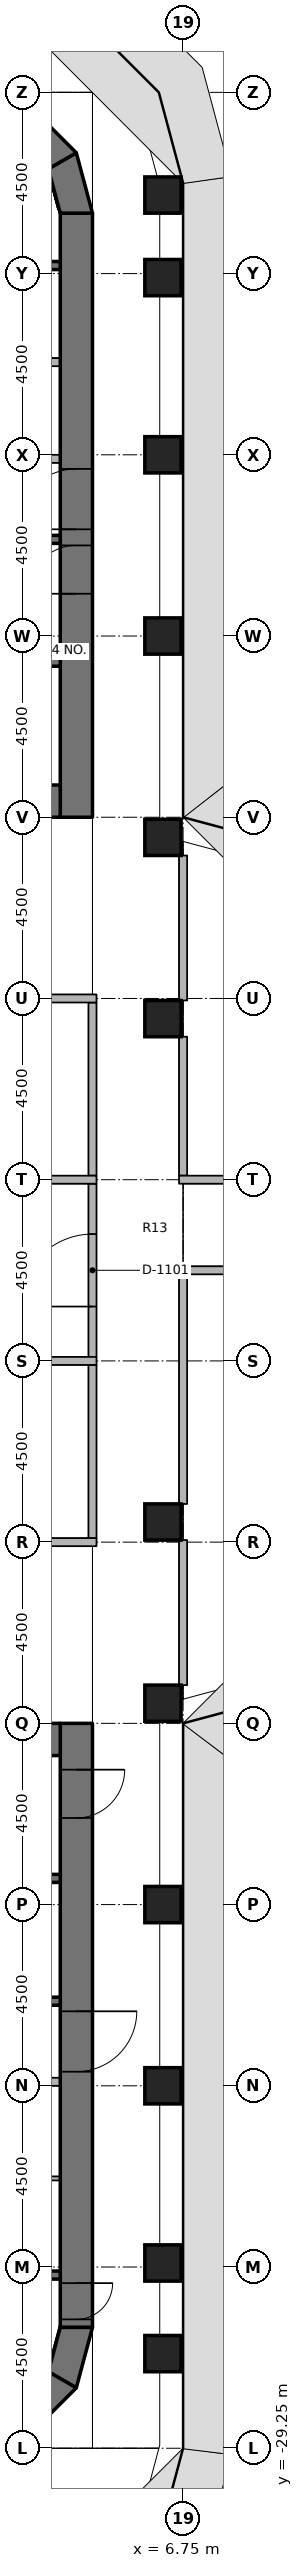
"""IFC4 building model, lengths in metres.
Left out: names, types, materials, properties, quantities, classifications, styles, units other than length and angle.
Written with IfcOpenShell. Run it as: python <this file> out.ifc"""

import sys

from ifc_helpers import new_model, si_unit, direction, frame, frame_2d, origin, origin_2d, place, context, subcontext, project, spatial, polyline, rectangle, outline, extrude, element, fill, save


model = new_model("IFC4")
c1 = context("Model", 3, precision=1e-05, world=origin(), true_north=direction((0.0, 1.0)))
c2 = subcontext(c1, "Body", "Model", "MODEL_VIEW")
j1 = project(units=[si_unit("LENGTHUNIT", "METRE"), si_unit("PLANEANGLEUNIT", "RADIAN")], contexts=[c1])
p1 = place(None, origin())
s1 = spatial("IfcSite", under=j1, at=p1, CompositionType="ELEMENT")
p2 = place(p1, origin())
s2 = spatial("IfcBuilding", under=s1, at=p2, CompositionType="ELEMENT")
p3 = place(p2, frame((0.0, 0.0, 124.6)))
s3 = spatial("IfcBuildingStorey", under=s2, at=p3, CompositionType="ELEMENT", Elevation=124.6)
for number, where, z_axis, x_axis in (
    (1, (6.25, -26.9, 0.0), (0.0, 0.0, 1.0), (1.0, 0.0, 0.0)),
    (2, (6.25, -24.65, 0.0), (0.0, 0.0, 1.0), (1.0, 0.0, 0.0)),
    (3, (6.25, -20.25, 0.0), (0.0, 0.0, 1.0), (1.0, 0.0, 0.0)),
    (4, (6.25, -15.75, 0.0), (0.0, 0.0, 1.0), (1.0, 0.0, 0.0)),
    (5, (6.25, -10.75, 0.0), (0.0, 0.0, 1.0), (1.0, 0.0, 0.0)),
    (6, (6.25, -6.25, 0.0), (0.0, 0.0, 1.0), (1.0, 0.0, 0.0)),
    (7, (6.25, 6.25, 0.0), (0.0, 0.0, 1.0), (1.0, 0.0, 0.0)),
    (8, (6.25, 10.75, 0.0), (0.0, 0.0, 1.0), (1.0, 0.0, 0.0)),
    (9, (6.25, 15.75, 0.0), (0.0, 0.0, 1.0), (1.0, 0.0, 0.0)),
    (10, (6.25, 20.25, 0.0), (0.0, 0.0, 1.0), (1.0, 0.0, 0.0)),
    (11, (6.25, 24.65, 0.0), (0.0, 0.0, 1.0), (1.0, 0.0, 0.0)),
    (12, (6.25, 26.7, 0.0), (0.0, 0.0, 1.0), (1.0, 0.0, 0.0)),
):
    element("IfcColumn", number, at=place(p3, frame(where, z_axis=z_axis, x_axis=x_axis)), inside=s3, PredefinedType="COLUMN", context=c2, shape_type="SweptSolid", body=[
        extrude(rectangle(XDim=0.9, YDim=0.9, at=origin_2d()), origin(), (0.0, 0.0, 1.0), 3.65),
    ])
p4 = place(p3, frame((4.1, 11.25, 0.0), z_axis=(0.0, 0.0, 1.0), x_axis=(0.0, 1.0, 0.0)))
e13 = element("IfcWall", 13, at=p4, inside=s3, PredefinedType="SHEAR", context=c2, shape_type="SweptSolid", body=[
    extrude(rectangle(XDim=15.0, YDim=0.8, at=frame_2d((7.5, 0.0))), origin(), (0.0, 0.0, 1.0), 3.8),
])
p5 = place(p4, frame((7.15, 0.0, 0.0)))
e14 = element("IfcOpeningElement", 14, at=p5, cuts=e13, PredefinedType="OPENING", context=c2, shape_type="SweptSolid", body=[
    extrude(rectangle(XDim=1.5, YDim=2.3, at=frame_2d((0.75, 1.15))), frame((0.0, 0.41, 0.0), z_axis=(0.0, -1.0, 0.0), x_axis=(1.0, 0.0, 0.0)), (0.0, 0.0, 1.0), 0.82),
])
p6 = place(p4, frame((5.55, 0.0, 0.0)))
e15 = element("IfcOpeningElement", 15, at=p6, cuts=e13, PredefinedType="OPENING", context=c2, shape_type="SweptSolid", body=[
    extrude(rectangle(XDim=1.2, YDim=2.1, at=frame_2d((0.6, 1.05))), frame((0.0, 0.41, 0.0), z_axis=(0.0, -1.0, 0.0), x_axis=(1.0, 0.0, 0.0)), (0.0, 0.0, 1.0), 0.82),
])
p7 = place(p3, frame((-3.7, 11.65, 0.0), z_axis=(0.0, 0.0, 1.0), x_axis=(1.0, 0.0, 0.0)))
e16 = element("IfcWall", 16, at=p7, inside=s3, PredefinedType="SHEAR", context=c2, shape_type="SweptSolid", body=[
    extrude(rectangle(XDim=7.4, YDim=0.8, at=frame_2d((3.7, 0.0))), origin(), (0.0, 0.0, 1.0), 3.8),
])
p8 = place(p3, origin())
e17 = element("IfcWall", 17, at=p8, inside=s3, PredefinedType="SHEAR", context=c2, shape_type="SweptSolid", body=[
    extrude(outline(polyline([(4.5, 26.25), (4.098, 27.75), (3.405, 27.35), (3.7, 26.25), (4.5, 26.25)])), origin(), (0.0, 0.0, 1.0), 3.8),
])
p9 = place(p3, origin())
e18 = element("IfcWall", 18, at=p9, inside=s3, PredefinedType="SHEAR", context=c2, shape_type="SweptSolid", body=[
    extrude(outline(polyline([(4.098, 27.75), (3.0, 28.848), (2.6, 28.155), (3.405, 27.35), (4.098, 27.75)])), origin(), (0.0, 0.0, 1.0), 3.8),
])
p10 = place(p3, frame((4.1, -11.25, 0.0), z_axis=(0.0, 0.0, 1.0), x_axis=(0.0, -1.0, 0.0)))
e19 = element("IfcWall", 19, at=p10, inside=s3, PredefinedType="SHEAR", context=c2, shape_type="SweptSolid", body=[
    extrude(rectangle(XDim=15.0, YDim=0.8, at=frame_2d((7.5, 0.0))), origin(), (0.0, 0.0, 1.0), 3.8),
])
p11 = place(p10, frame((7.15, 0.0, 0.0)))
e20 = element("IfcOpeningElement", 20, at=p11, cuts=e19, PredefinedType="OPENING", context=c2, shape_type="SweptSolid", body=[
    extrude(rectangle(XDim=1.5, YDim=2.3, at=frame_2d((0.75, 1.15))), frame((0.0, 0.41, 0.0), z_axis=(0.0, -1.0, 0.0), x_axis=(1.0, 0.0, 0.0)), (0.0, 0.0, 1.0), 0.82),
])
p12 = place(p10, frame((13.9, 0.0, 0.0)))
e21 = element("IfcOpeningElement", 21, at=p12, cuts=e19, PredefinedType="OPENING", context=c2, shape_type="SweptSolid", body=[
    extrude(rectangle(XDim=0.9, YDim=2.1, at=frame_2d((0.45, 1.05))), frame((0.0, 0.41, 0.0), z_axis=(0.0, -1.0, 0.0), x_axis=(1.0, 0.0, 0.0)), (0.0, 0.0, 1.0), 0.82),
])
p13 = place(p10, frame((1.15, 0.0, 0.0)))
e22 = element("IfcOpeningElement", 22, at=p13, cuts=e19, PredefinedType="OPENING", context=c2, shape_type="SweptSolid", body=[
    extrude(rectangle(XDim=1.2, YDim=2.1, at=frame_2d((0.6, 1.05))), frame((0.0, 0.41, 0.0), z_axis=(0.0, -1.0, 0.0), x_axis=(1.0, 0.0, 0.0)), (0.0, 0.0, 1.0), 0.82),
])
p14 = place(p3, frame((-3.7, -11.65, 0.0), z_axis=(0.0, 0.0, 1.0), x_axis=(1.0, 0.0, 0.0)))
e23 = element("IfcWall", 23, at=p14, inside=s3, PredefinedType="SHEAR", context=c2, shape_type="SweptSolid", body=[
    extrude(rectangle(XDim=7.4, YDim=0.8, at=frame_2d((3.7, 0.0))), origin(), (0.0, 0.0, 1.0), 3.8),
])
p15 = place(p3, origin())
e24 = element("IfcWall", 24, at=p15, inside=s3, PredefinedType="SHEAR", context=c2, shape_type="SweptSolid", body=[
    extrude(outline(polyline([(4.5, -26.25), (4.098, -27.75), (3.405, -27.35), (3.7, -26.25), (4.5, -26.25)])), origin(), (0.0, 0.0, 1.0), 3.8),
])
p16 = place(p3, origin())
e25 = element("IfcWall", 25, at=p16, inside=s3, PredefinedType="SHEAR", context=c2, shape_type="SweptSolid", body=[
    extrude(outline(polyline([(4.098, -27.75), (3.0, -28.848), (2.6, -28.155), (3.405, -27.35), (4.098, -27.75)])), origin(), (0.0, 0.0, 1.0), 3.8),
])
for number, where, z_axis, x_axis in (
    (26, (-3.7, 24.95, 0.0), (0.0, 0.0, 1.0), (1.0, 0.0, 0.0)),
    (27, (-3.7, 18.15, 0.0), (0.0, 0.0, 1.0), (1.0, 0.0, 0.0)),
    (28, (-3.7, 15.1, 0.0), (0.0, 0.0, 1.0), (1.0, 0.0, 0.0)),
):
    element("IfcWall", number, at=place(p3, frame(where, z_axis=z_axis, x_axis=x_axis)), inside=s3, PredefinedType="SHEAR", context=c2, shape_type="SweptSolid", body=[
        extrude(rectangle(XDim=7.4, YDim=0.2, at=frame_2d((3.7, 0.0))), origin(), (0.0, 0.0, 1.0), 3.65),
    ])
p17 = place(p3, frame((0.9, 20.15, 0.0), z_axis=(0.0, 0.0, 1.0), x_axis=(1.0, 0.0, 0.0)))
e29 = element("IfcWall", 29, at=p17, inside=s3, PredefinedType="PARTITIONING", context=c2, shape_type="SweptSolid", body=[
    extrude(rectangle(XDim=2.8, YDim=0.2, at=frame_2d((1.4, 0.0))), origin(), (0.0, 0.0, 1.0), 3.65),
])
p18 = place(p3, frame((1.1, 22.55, 0.0), z_axis=(0.0, 0.0, 1.0), x_axis=(1.0, 0.0, 0.0)))
e30 = element("IfcWall", 30, at=p18, inside=s3, PredefinedType="PARTITIONING", context=c2, shape_type="SweptSolid", body=[
    extrude(rectangle(XDim=2.6, YDim=0.2, at=frame_2d((1.3, 0.0))), origin(), (0.0, 0.0, 1.0), 3.65),
])
for number, where, z_axis, x_axis in (
    (31, (3.7, -24.95, 0.0), (0.0, 0.0, 1.0), (-1.0, 0.0, 0.0)),
    (32, (3.7, -18.15, 0.0), (0.0, 0.0, 1.0), (-1.0, 0.0, 0.0)),
    (33, (3.7, -15.1, 0.0), (0.0, 0.0, 1.0), (-1.0, 0.0, 0.0)),
):
    element("IfcWall", number, at=place(p3, frame(where, z_axis=z_axis, x_axis=x_axis)), inside=s3, PredefinedType="SHEAR", context=c2, shape_type="SweptSolid", body=[
        extrude(rectangle(XDim=7.4, YDim=0.2, at=frame_2d((3.7, 0.0))), origin(), (0.0, 0.0, 1.0), 3.65),
    ])
p19 = place(p3, frame((3.7, -20.15, 0.0), z_axis=(0.0, 0.0, 1.0), x_axis=(-1.0, 0.0, 0.0)))
e34 = element("IfcWall", 34, at=p19, inside=s3, PredefinedType="PARTITIONING", context=c2, shape_type="SweptSolid", body=[
    extrude(rectangle(XDim=2.8, YDim=0.2, at=frame_2d((1.4, 0.0))), origin(), (0.0, 0.0, 1.0), 3.65),
])
p20 = place(p3, frame((3.7, -22.55, 0.0), z_axis=(0.0, 0.0, 1.0), x_axis=(-1.0, 0.0, 0.0)))
e35 = element("IfcWall", 35, at=p20, inside=s3, PredefinedType="PARTITIONING", context=c2, shape_type="SweptSolid", body=[
    extrude(rectangle(XDim=2.6, YDim=0.1, at=frame_2d((1.3, 0.0))), origin(), (0.0, 0.0, 1.0), 3.65),
])
p21 = place(p3, frame((4.5, 2.35, 0.0), z_axis=(0.0, 0.0, 1.0), x_axis=(0.0, 1.0, 0.0)))
e36 = element("IfcWall", 36, at=p21, inside=s3, PredefinedType="PARTITIONING", context=c2, shape_type="SweptSolid", body=[
    extrude(rectangle(XDim=4.3, YDim=0.2, at=frame_2d((2.15, 0.0))), origin(), (0.0, 0.0, 1.0), 2.738),
])
p22 = place(p3, frame((4.5, -2.15, 0.0), z_axis=(0.0, 0.0, 1.0), x_axis=(0.0, 1.0, 0.0)))
e37 = element("IfcWall", 37, at=p22, inside=s3, PredefinedType="PARTITIONING", context=c2, shape_type="SweptSolid", body=[
    extrude(rectangle(XDim=4.3, YDim=0.2, at=frame_2d((2.15, 0.0))), origin(), (0.0, 0.0, 1.0), 2.738),
])
p23 = place(p22, frame((1.25, 0.0, 0.0)))
e38 = element("IfcOpeningElement", 38, at=p23, cuts=e37, PredefinedType="OPENING", context=c2, shape_type="SweptSolid", body=[
    extrude(rectangle(XDim=1.8, YDim=2.1, at=frame_2d((0.9, 1.05))), frame((0.0, 0.11, 0.0), z_axis=(0.0, -1.0, 0.0), x_axis=(1.0, 0.0, 0.0)), (0.0, 0.0, 1.0), 0.22),
])
p24 = place(p3, frame((4.5, -6.65, 0.0), z_axis=(0.0, 0.0, 1.0), x_axis=(0.0, 1.0, 0.0)))
e39 = element("IfcWall", 39, at=p24, inside=s3, PredefinedType="PARTITIONING", context=c2, shape_type="SweptSolid", body=[
    extrude(rectangle(XDim=4.3, YDim=0.2, at=frame_2d((2.15, 0.0))), origin(), (0.0, 0.0, 1.0), 2.738),
])
p25 = place(p3, frame((6.75, 2.35, 0.0), z_axis=(0.0, 0.0, 1.0), x_axis=(0.0, 1.0, 0.0)))
e40 = element("IfcWall", 40, at=p25, inside=s3, PredefinedType="PARTITIONING", context=c2, shape_type="SweptSolid", body=[
    extrude(rectangle(XDim=3.45, YDim=0.2, at=frame_2d((1.725, 0.0))), origin(), (0.0, 0.0, 1.0), 2.738),
])
for number, where, z_axis, x_axis in (
    (41, (6.75, 6.7, 0.0), (0.0, 0.0, 1.0), (0.0, 1.0, 0.0)),
    (42, (6.75, -10.3, 0.0), (0.0, 0.0, 1.0), (0.0, 1.0, 0.0)),
):
    element("IfcWall", number, at=place(p3, frame(where, z_axis=z_axis, x_axis=x_axis)), inside=s3, PredefinedType="PARTITIONING", context=c2, shape_type="SweptSolid", body=[
        extrude(rectangle(XDim=3.6, YDim=0.2, at=frame_2d((1.8, 0.0))), origin(), (0.0, 0.0, 1.0), 2.738),
    ])
p26 = place(p3, frame((6.75, -5.8, 0.0), z_axis=(0.0, 0.0, 1.0), x_axis=(0.0, 1.0, 0.0)))
e43 = element("IfcWall", 43, at=p26, inside=s3, PredefinedType="PARTITIONING", context=c2, shape_type="SweptSolid", body=[
    extrude(rectangle(XDim=5.7, YDim=0.2, at=frame_2d((2.85, 0.0))), origin(), (0.0, 0.0, 1.0), 2.738),
])
p27 = place(p3, frame((4.6, 6.75, 0.0), z_axis=(0.0, 0.0, 1.0), x_axis=(-1.0, 0.0, 0.0)))
e44 = element("IfcWall", 44, at=p27, inside=s3, PredefinedType="PARTITIONING", context=c2, shape_type="SweptSolid", body=[
    extrude(rectangle(XDim=9.2, YDim=0.2, at=frame_2d((4.6, 0.0))), origin(), (0.0, 0.0, 1.0), 2.738),
])
p28 = place(p27, frame((4.1, 0.0, 0.0)))
e45 = element("IfcOpeningElement", 45, at=p28, cuts=e44, PredefinedType="OPENING", context=c2, shape_type="SweptSolid", body=[
    extrude(rectangle(XDim=1.0, YDim=2.1, at=frame_2d((0.5, 1.05))), frame((0.0, 0.11, 0.0), z_axis=(0.0, -1.0, 0.0), x_axis=(1.0, 0.0, 0.0)), (0.0, 0.0, 1.0), 0.22),
])
p29 = place(p3, frame((-4.6, -6.75, 0.0), z_axis=(0.0, 0.0, 1.0), x_axis=(1.0, 0.0, 0.0)))
e46 = element("IfcWall", 46, at=p29, inside=s3, PredefinedType="PARTITIONING", context=c2, shape_type="SweptSolid", body=[
    extrude(rectangle(XDim=9.2, YDim=0.2, at=frame_2d((4.6, 0.0))), origin(), (0.0, 0.0, 1.0), 2.738),
])
p30 = place(p29, frame((4.1, 0.0, 0.0)))
e47 = element("IfcOpeningElement", 47, at=p30, cuts=e46, PredefinedType="OPENING", context=c2, shape_type="SweptSolid", body=[
    extrude(rectangle(XDim=1.0, YDim=2.1, at=frame_2d((0.5, 1.05))), frame((0.0, 0.11, 0.0), z_axis=(0.0, -1.0, 0.0), x_axis=(1.0, 0.0, 0.0)), (0.0, 0.0, 1.0), 0.22),
])
for number, where, z_axis, x_axis in (
    (48, (-4.6, 2.25, 0.0), (0.0, 0.0, 1.0), (1.0, 0.0, 0.0)),
    (49, (-4.6, -2.25, 0.0), (0.0, 0.0, 1.0), (1.0, 0.0, 0.0)),
):
    element("IfcWall", number, at=place(p3, frame(where, z_axis=z_axis, x_axis=x_axis)), inside=s3, PredefinedType="PARTITIONING", context=c2, shape_type="SweptSolid", body=[
        extrude(rectangle(XDim=9.2, YDim=0.2, at=frame_2d((4.6, 0.0))), origin(), (0.0, 0.0, 1.0), 2.738),
    ])
p31 = place(p3, frame((6.65, 2.25, 0.0), z_axis=(0.0, 0.0, 1.0), x_axis=(1.0, 0.0, 0.0)))
e50 = element("IfcWall", 50, at=p31, inside=s3, PredefinedType="PARTITIONING", context=c2, shape_type="SweptSolid", body=[
    extrude(rectangle(XDim=4.7, YDim=0.2, at=frame_2d((2.35, 0.0))), origin(), (0.0, 0.0, 1.0), 2.738),
])
p32 = place(p31, frame((1.85, 0.0, 0.0)))
e51 = element("IfcOpeningElement", 51, at=p32, cuts=e50, PredefinedType="OPENING", context=c2, shape_type="SweptSolid", body=[
    extrude(rectangle(XDim=1.0, YDim=2.1, at=frame_2d((0.5, 1.05))), frame((0.0, 0.11, 0.0), z_axis=(0.0, -1.0, 0.0), x_axis=(1.0, 0.0, 0.0)), (0.0, 0.0, 1.0), 0.22),
])
p33 = place(p3, frame((11.35, 0.0, 0.0), z_axis=(0.0, 0.0, 1.0), x_axis=(-1.0, 0.0, 0.0)))
e52 = element("IfcWall", 52, at=p33, inside=s3, PredefinedType="PARTITIONING", context=c2, shape_type="SweptSolid", body=[
    extrude(rectangle(XDim=4.7, YDim=0.2, at=frame_2d((2.35, 0.0))), origin(), (0.0, 0.0, 1.0), 2.738),
])
p34 = place(p33, frame((1.85, 0.0, 0.0)))
e53 = element("IfcOpeningElement", 53, at=p34, cuts=e52, PredefinedType="OPENING", context=c2, shape_type="SweptSolid", body=[
    extrude(rectangle(XDim=1.0, YDim=2.1, at=frame_2d((0.5, 1.05))), frame((0.0, 0.11, 0.0), z_axis=(0.0, -1.0, 0.0), x_axis=(1.0, 0.0, 0.0)), (0.0, 0.0, 1.0), 0.22),
])
p35 = place(p5, origin())
e54 = element("IfcDoor", 54, at=p35, inside=s3, OperationType="DOUBLE_DOOR_SINGLE_SWING", PredefinedType="DOOR", context=c2, shape_type="SweptSolid", body=[
    extrude(rectangle(XDim=1.5, YDim=2.3, at=frame_2d((0.75, 1.15))), frame((0.0, 0.025, 0.0), z_axis=(0.0, -1.0, 0.0), x_axis=(1.0, 0.0, 0.0)), (0.0, 0.0, 1.0), 0.05),
])
fill(e14, e54)
p36 = place(p6, origin())
e55 = element("IfcDoor", 55, at=p36, inside=s3, OperationType="SINGLE_SWING_RIGHT", PredefinedType="DOOR", context=c2, shape_type="SweptSolid", body=[
    extrude(rectangle(XDim=1.2, YDim=2.1, at=frame_2d((0.6, 1.05))), frame((0.0, 0.025, 0.0), z_axis=(0.0, -1.0, 0.0), x_axis=(1.0, 0.0, 0.0)), (0.0, 0.0, 1.0), 0.05),
])
fill(e15, e55)
p37 = place(p11, origin())
e56 = element("IfcDoor", 56, at=p37, inside=s3, OperationType="DOUBLE_DOOR_SINGLE_SWING", PredefinedType="DOOR", context=c2, shape_type="SweptSolid", body=[
    extrude(rectangle(XDim=1.5, YDim=2.3, at=frame_2d((0.75, 1.15))), frame((0.0, 0.025, 0.0), z_axis=(0.0, -1.0, 0.0), x_axis=(1.0, 0.0, 0.0)), (0.0, 0.0, 1.0), 0.05),
])
fill(e20, e56)
p38 = place(p12, origin())
e57 = element("IfcDoor", 57, at=p38, inside=s3, OperationType="SINGLE_SWING_LEFT", PredefinedType="DOOR", context=c2, shape_type="SweptSolid", body=[
    extrude(rectangle(XDim=0.9, YDim=2.1, at=frame_2d((0.45, 1.05))), frame((0.0, 0.025, 0.0), z_axis=(0.0, -1.0, 0.0), x_axis=(1.0, 0.0, 0.0)), (0.0, 0.0, 1.0), 0.05),
])
fill(e21, e57)
p39 = place(p13, origin())
e58 = element("IfcDoor", 58, at=p39, inside=s3, OperationType="SINGLE_SWING_LEFT", PredefinedType="DOOR", context=c2, shape_type="SweptSolid", body=[
    extrude(rectangle(XDim=1.2, YDim=2.1, at=frame_2d((0.6, 1.05))), frame((0.0, 0.025, 0.0), z_axis=(0.0, -1.0, 0.0), x_axis=(1.0, 0.0, 0.0)), (0.0, 0.0, 1.0), 0.05),
])
fill(e22, e58)
p40 = place(p23, origin())
e59 = element("IfcDoor", 59, at=p40, inside=s3, OperationType="DOUBLE_DOOR_SINGLE_SWING", PredefinedType="DOOR", context=c2, shape_type="SweptSolid", body=[
    extrude(rectangle(XDim=1.8, YDim=2.1, at=frame_2d((0.9, 1.05))), frame((0.0, 0.025, 0.0), z_axis=(0.0, -1.0, 0.0), x_axis=(1.0, 0.0, 0.0)), (0.0, 0.0, 1.0), 0.05),
])
fill(e38, e59)
save(model, sys.argv[1])
